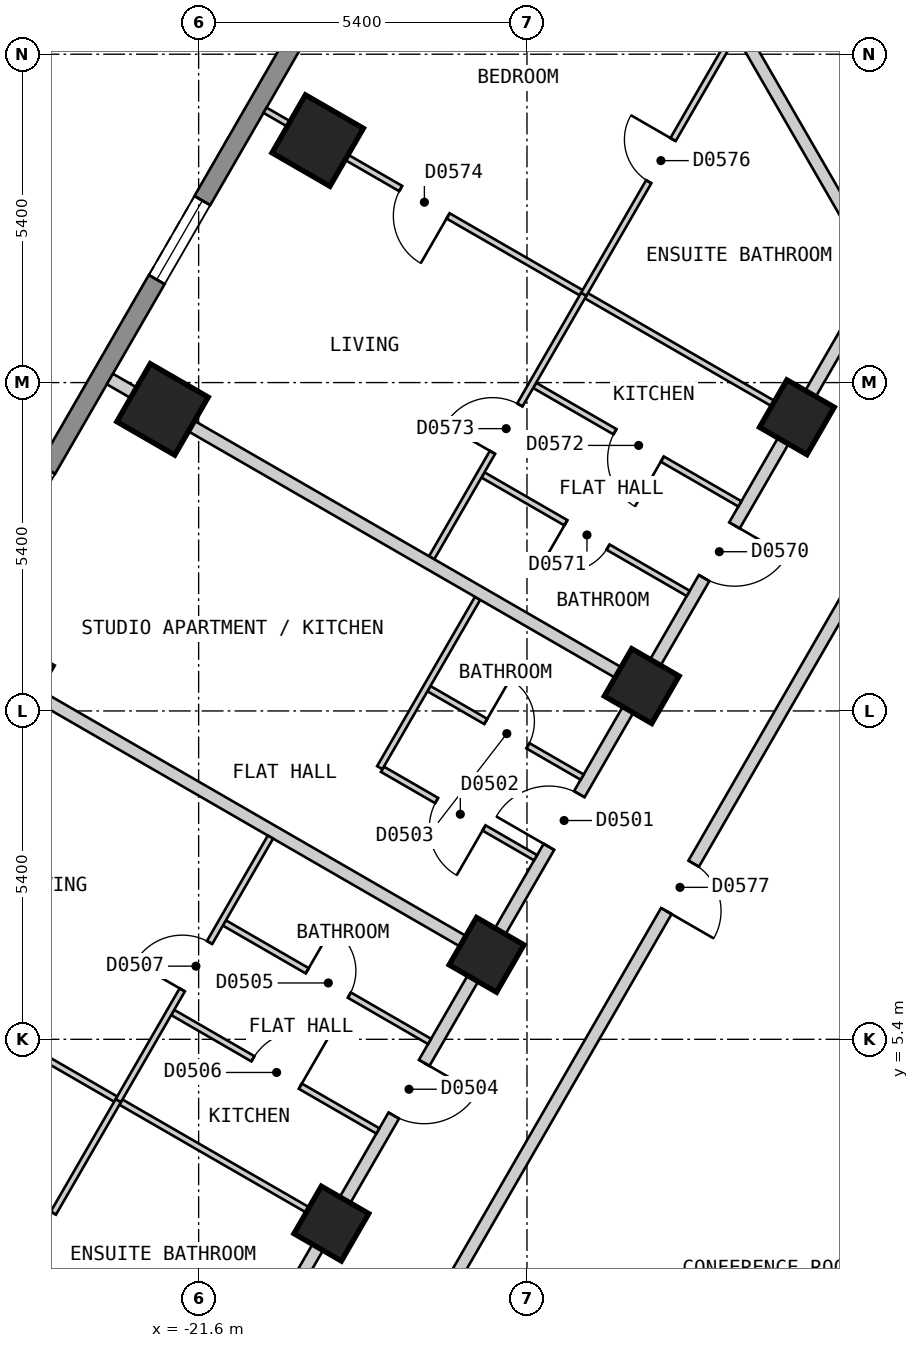
"""IFC4 building model, lengths in metres.
Left out: names, types, materials, properties, quantities, classifications, styles, units other than length and angle.
Written with IfcOpenShell. Run it as: python <this file> out.ifc"""

import sys

from ifc_helpers import new_model, si_unit, direction, frame, frame_2d, origin, origin_2d, place, context, subcontext, project, spatial, polyline, rectangle, outline, extrude, element, fill, save


model = new_model("IFC4")
c1 = context("Model", 3, precision=1e-05, world=origin(), true_north=direction((0.0, 1.0)))
c2 = subcontext(c1, "Body", "Model", "MODEL_VIEW")
j1 = project(units=[si_unit("LENGTHUNIT", "METRE"), si_unit("PLANEANGLEUNIT", "RADIAN")], contexts=[c1])
p1 = place(None, origin())
s1 = spatial("IfcSite", under=j1, at=p1, CompositionType="ELEMENT")
p2 = place(p1, origin())
s2 = spatial("IfcBuilding", under=s1, at=p2, CompositionType="ELEMENT")
p3 = place(p2, frame((0.0, 0.0, 44.4)))
s3 = spatial("IfcBuildingStorey", under=s2, at=p3, CompositionType="ELEMENT", Elevation=44.4)
for number, where, z_axis, x_axis in (
    (1, (-19.642, 20.18, 0.0), (0.0, 0.0, 1.0), (-0.5, -0.866, 0.0)),
    (2, (-22.194, 15.759, 0.0), (0.0, 0.0, 1.0), (-0.5, -0.866, 0.0)),
    (3, (-24.746, 11.339, 0.0), (0.0, 0.0, 1.0), (-0.5, -0.866, 0.0)),
):
    element("IfcColumn", number, at=place(p3, frame(where, z_axis=z_axis, x_axis=x_axis)), inside=s3, PredefinedType="COLUMN", context=c2, shape_type="SweptSolid", body=[
        extrude(rectangle(XDim=1.1, YDim=1.1, at=origin_2d()), origin(), (0.0, 0.0, 1.0), 3.0),
    ])
for number, where, z_axis, x_axis in (
    (4, (-11.761, 15.63, 0.0), (0.0, 0.0, 1.0), (-0.5, -0.866, 0.0)),
    (5, (-14.313, 11.209, 0.0), (0.0, 0.0, 1.0), (-0.5, -0.866, 0.0)),
    (6, (-16.865, 6.789, 0.0), (0.0, 0.0, 1.0), (-0.5, -0.866, 0.0)),
    (7, (-19.417, 2.369, 0.0), (0.0, 0.0, 1.0), (-0.5, -0.866, 0.0)),
):
    element("IfcColumn", number, at=place(p3, frame(where, z_axis=z_axis, x_axis=x_axis)), inside=s3, PredefinedType="COLUMN", context=c2, shape_type="SweptSolid", body=[
        extrude(rectangle(XDim=0.9, YDim=0.9, at=origin_2d()), origin(), (0.0, 0.0, 1.0), 3.0),
    ])
p4 = place(p3, frame((-17.71, 25.825, 0.0), z_axis=(0.0, 0.0, 1.0), x_axis=(-0.500001938803, -0.866024284413, 0.0)))
e8 = element("IfcWall", 8, at=p4, inside=s3, PredefinedType="SOLIDWALL", context=c2, shape_type="SweptSolid", body=[
    extrude(outline(polyline([(0.0, -0.15), (27.02, -0.15), (26.94, 0.15), (0.08, 0.15), (0.0, -0.15)])), origin(), (0.0, 0.0, 1.0), 2.7),
])
p5 = place(p4, frame((2.553, 0.0, 0.15)))
e9 = element("IfcOpeningElement", 9, at=p5, cuts=e8, PredefinedType="OPENING", context=c2, shape_type="SweptSolid", body=[
    extrude(rectangle(XDim=1.5, YDim=2.1, at=frame_2d((0.75, 1.05))), frame((0.0, 0.16, 0.0), z_axis=(0.0, -1.0, 0.0), x_axis=(1.0, 0.0, 0.0)), (0.0, 0.0, 1.0), 0.32),
])
p6 = place(p4, frame((7.658, 0.0, 0.15)))
e10 = element("IfcOpeningElement", 10, at=p6, cuts=e8, PredefinedType="OPENING", context=c2, shape_type="SweptSolid", body=[
    extrude(rectangle(XDim=1.5, YDim=2.1, at=frame_2d((0.75, 1.05))), frame((0.0, 0.16, 0.0), z_axis=(0.0, -1.0, 0.0), x_axis=(1.0, 0.0, 0.0)), (0.0, 0.0, 1.0), 0.32),
])
p7 = place(p4, frame((12.761, 0.0, 0.15)))
e11 = element("IfcOpeningElement", 11, at=p7, cuts=e8, PredefinedType="OPENING", context=c2, shape_type="SweptSolid", body=[
    extrude(rectangle(XDim=1.5, YDim=2.1, at=frame_2d((0.75, 1.05))), frame((0.0, 0.16, 0.0), z_axis=(0.0, -1.0, 0.0), x_axis=(1.0, 0.0, 0.0)), (0.0, 0.0, 1.0), 0.32),
])
p8 = place(p4, frame((17.865, 0.0, 0.15)))
e12 = element("IfcOpeningElement", 12, at=p8, cuts=e8, PredefinedType="OPENING", context=c2, shape_type="SweptSolid", body=[
    extrude(rectangle(XDim=1.5, YDim=2.1, at=frame_2d((0.75, 1.05))), frame((0.0, 0.16, 0.0), z_axis=(0.0, -1.0, 0.0), x_axis=(1.0, 0.0, 0.0)), (0.0, 0.0, 1.0), 0.32),
])
p9 = place(p4, frame((22.969, 0.0, 0.15)))
e13 = element("IfcOpeningElement", 13, at=p9, cuts=e8, PredefinedType="OPENING", context=c2, shape_type="SweptSolid", body=[
    extrude(rectangle(XDim=1.5, YDim=2.1, at=frame_2d((0.75, 1.05))), frame((0.0, 0.16, 0.0), z_axis=(0.0, -1.0, 0.0), x_axis=(1.0, 0.0, 0.0)), (0.0, 0.0, 1.0), 0.32),
])
p10 = place(p3, frame((-18.244, -0.001, 0.0), z_axis=(0.0, 0.0, 1.0), x_axis=(0.499962999376, 0.866046765051, 0.0)))
e14 = element("IfcWall", 14, at=p10, inside=s3, PredefinedType="PARTITIONING", context=c2, shape_type="SweptSolid", body=[
    extrude(rectangle(XDim=18.245, YDim=0.2, at=frame_2d((9.123, 0.0))), origin(), (0.0, 0.0, 1.0), 2.7),
])
p11 = place(p10, frame((8.672, 0.0, 0.0)))
e15 = element("IfcOpeningElement", 15, at=p11, cuts=e14, PredefinedType="OPENING", context=c2, shape_type="SweptSolid", body=[
    extrude(rectangle(XDim=0.9, YDim=2.1, at=frame_2d((0.45, 1.05))), frame((0.0, 0.11, 0.0), z_axis=(0.0, -1.0, 0.0), x_axis=(1.0, 0.0, 0.0)), (0.0, 0.0, 1.0), 0.22),
])
p12 = place(p3, frame((-20.727, 0.099, 0.0), z_axis=(0.0, 0.0, 1.0), x_axis=(0.499993204491, 0.866029327138, 0.0)))
e16 = element("IfcWall", 16, at=p12, inside=s3, PredefinedType="PARTITIONING", context=c2, shape_type="SweptSolid", body=[
    extrude(rectangle(XDim=20.554, YDim=0.2, at=frame_2d((10.277, 0.0))), origin(), (0.0, 0.0, 1.0), 2.7),
])
p13 = place(p12, frame((9.776, 0.0, 0.0)))
e17 = element("IfcOpeningElement", 17, at=p13, cuts=e16, PredefinedType="OPENING", context=c2, shape_type="SweptSolid", body=[
    extrude(rectangle(XDim=1.0, YDim=2.1, at=frame_2d((0.5, 1.05))), frame((0.0, 0.11, 0.0), z_axis=(0.0, -1.0, 0.0), x_axis=(1.0, 0.0, 0.0)), (0.0, 0.0, 1.0), 0.22),
])
p14 = place(p12, frame((4.673, 0.0, 0.0)))
e18 = element("IfcOpeningElement", 18, at=p14, cuts=e16, PredefinedType="OPENING", context=c2, shape_type="SweptSolid", body=[
    extrude(rectangle(XDim=1.0, YDim=2.1, at=frame_2d((0.5, 1.05))), frame((0.0, 0.11, 0.0), z_axis=(0.0, -1.0, 0.0), x_axis=(1.0, 0.0, 0.0)), (0.0, 0.0, 1.0), 0.22),
])
p15 = place(p12, frame((14.88, 0.0, 0.0)))
e19 = element("IfcOpeningElement", 19, at=p15, cuts=e16, PredefinedType="OPENING", context=c2, shape_type="SweptSolid", body=[
    extrude(rectangle(XDim=1.0, YDim=2.1, at=frame_2d((0.5, 1.05))), frame((0.0, 0.11, 0.0), z_axis=(0.0, -1.0, 0.0), x_axis=(1.0, 0.0, 0.0)), (0.0, 0.0, 1.0), 0.22),
])
p16 = place(p3, frame((-21.177, 7.314, 0.0), z_axis=(0.0, 0.0, 1.0), x_axis=(0.865979019114, -0.500080332001, 0.0)))
e20 = element("IfcWall", 20, at=p16, inside=s3, PredefinedType="PARTITIONING", context=c2, shape_type="SweptSolid", body=[
    extrude(rectangle(XDim=3.897, YDim=0.1, at=frame_2d((1.949, 0.0))), origin(), (0.0, 0.0, 1.0), 2.7),
])
p17 = place(p16, frame((1.574, 0.0, 0.0)))
e21 = element("IfcOpeningElement", 21, at=p17, cuts=e20, PredefinedType="OPENING", context=c2, shape_type="SweptSolid", body=[
    extrude(rectangle(XDim=0.8, YDim=2.1, at=frame_2d((0.4, 1.05))), frame((0.0, 0.06, 0.0), z_axis=(0.0, -1.0, 0.0), x_axis=(1.0, 0.0, 0.0)), (0.0, 0.0, 1.0), 0.12),
])
p18 = place(p3, frame((-22.027, 5.842, 0.0), z_axis=(0.0, 0.0, 1.0), x_axis=(0.865979019114, -0.500080332001, 0.0)))
e22 = element("IfcWall", 22, at=p18, inside=s3, PredefinedType="PARTITIONING", context=c2, shape_type="SweptSolid", body=[
    extrude(rectangle(XDim=3.897, YDim=0.1, at=frame_2d((1.949, 0.0))), origin(), (0.0, 0.0, 1.0), 2.7),
])
p19 = place(p18, frame((1.524, 0.0, 0.0)))
e23 = element("IfcOpeningElement", 23, at=p19, cuts=e22, PredefinedType="OPENING", context=c2, shape_type="SweptSolid", body=[
    extrude(rectangle(XDim=0.9, YDim=2.1, at=frame_2d((0.45, 1.05))), frame((0.0, 0.06, 0.0), z_axis=(0.0, -1.0, 0.0), x_axis=(1.0, 0.0, 0.0)), (0.0, 0.0, 1.0), 0.12),
])
p20 = place(p3, frame((-28.164, 7.419, 0.0), z_axis=(0.0, 0.0, 1.0), x_axis=(0.866047370643, -0.499961950354, 0.0)))
e24 = element("IfcWall", 24, at=p20, inside=s3, PredefinedType="PARTITIONING", context=c2, shape_type="SweptSolid", body=[
    extrude(rectangle(XDim=10.001, YDim=0.1, at=frame_2d((5.0, 0.0))), origin(), (0.0, 0.0, 1.0), 2.7),
])
p21 = place(p20, frame((2.577, 0.0, 0.0)))
e25 = element("IfcOpeningElement", 25, at=p21, cuts=e24, PredefinedType="OPENING", context=c2, shape_type="SweptSolid", body=[
    extrude(rectangle(XDim=0.9, YDim=2.1, at=frame_2d((0.45, 1.05))), frame((0.0, 0.06, 0.0), z_axis=(0.0, -1.0, 0.0), x_axis=(1.0, 0.0, 0.0)), (0.0, 0.0, 1.0), 0.12),
])
p22 = place(p3, frame((-18.577, 9.841, 0.0), z_axis=(0.0, 0.0, 1.0), x_axis=(0.865899003441, -0.500218867937, 0.0)))
e26 = element("IfcWall", 26, at=p22, inside=s3, PredefinedType="PARTITIONING", context=c2, shape_type="SweptSolid", body=[
    extrude(rectangle(XDim=2.909, YDim=0.1, at=frame_2d((1.455, 0.0))), origin(), (0.0, 0.0, 1.0), 2.7),
])
p23 = place(p22, frame((1.029, 0.0, 0.0)))
e27 = element("IfcOpeningElement", 27, at=p23, cuts=e26, PredefinedType="OPENING", context=c2, shape_type="SweptSolid", body=[
    extrude(rectangle(XDim=0.9, YDim=2.1, at=frame_2d((0.45, 1.05))), frame((0.0, 0.06, 0.0), z_axis=(0.0, -1.0, 0.0), x_axis=(1.0, 0.0, 0.0)), (0.0, 0.0, 1.0), 0.12),
])
p24 = place(p3, frame((-16.923, 14.681, 0.0), z_axis=(0.0, 0.0, 1.0), x_axis=(0.866087525071, -0.499892387336, 0.0)))
e28 = element("IfcWall", 28, at=p24, inside=s3, PredefinedType="PARTITIONING", context=c2, shape_type="SweptSolid", body=[
    extrude(rectangle(XDim=3.897, YDim=0.1, at=frame_2d((1.948, 0.0))), origin(), (0.0, 0.0, 1.0), 2.7),
])
p25 = place(p24, frame((1.574, 0.0, 0.0)))
e29 = element("IfcOpeningElement", 29, at=p25, cuts=e28, PredefinedType="OPENING", context=c2, shape_type="SweptSolid", body=[
    extrude(rectangle(XDim=0.8, YDim=2.1, at=frame_2d((0.4, 1.05))), frame((0.0, 0.06, 0.0), z_axis=(0.0, -1.0, 0.0), x_axis=(1.0, 0.0, 0.0)), (0.0, 0.0, 1.0), 0.12),
])
p26 = place(p3, frame((-16.073, 16.154, 0.0), z_axis=(0.0, 0.0, 1.0), x_axis=(0.865979019114, -0.500080332001, 0.0)))
e30 = element("IfcWall", 30, at=p26, inside=s3, PredefinedType="PARTITIONING", context=c2, shape_type="SweptSolid", body=[
    extrude(rectangle(XDim=3.897, YDim=0.1, at=frame_2d((1.949, 0.0))), origin(), (0.0, 0.0, 1.0), 2.7),
])
p27 = place(p26, frame((1.524, 0.0, 0.0)))
e31 = element("IfcOpeningElement", 31, at=p27, cuts=e30, PredefinedType="OPENING", context=c2, shape_type="SweptSolid", body=[
    extrude(rectangle(XDim=0.9, YDim=2.1, at=frame_2d((0.45, 1.05))), frame((0.0, 0.06, 0.0), z_axis=(0.0, -1.0, 0.0), x_axis=(1.0, 0.0, 0.0)), (0.0, 0.0, 1.0), 0.12),
])
p28 = place(p3, frame((-17.813, 11.167, 0.0), z_axis=(0.0, 0.0, 1.0), x_axis=(0.866087824531, -0.499891868507, 0.0)))
e32 = element("IfcWall", 32, at=p28, inside=s3, PredefinedType="PARTITIONING", context=c2, shape_type="SweptSolid", body=[
    extrude(rectangle(XDim=2.911, YDim=0.1, at=frame_2d((1.456, 0.0))), origin(), (0.0, 0.0, 1.0), 2.7),
])
p29 = place(p28, frame((1.08, 0.0, 0.0)))
e33 = element("IfcOpeningElement", 33, at=p29, cuts=e32, PredefinedType="OPENING", context=c2, shape_type="SweptSolid", body=[
    extrude(rectangle(XDim=0.8, YDim=2.1, at=frame_2d((0.4, 1.05))), frame((0.0, 0.06, 0.0), z_axis=(0.0, -1.0, 0.0), x_axis=(1.0, 0.0, 0.0)), (0.0, 0.0, 1.0), 0.12),
])
p30 = place(p3, frame((-20.508, 20.679, 0.0), z_axis=(0.0, 0.0, 1.0), x_axis=(0.866047370643, -0.499961950354, 0.0)))
e34 = element("IfcWall", 34, at=p30, inside=s3, PredefinedType="PARTITIONING", context=c2, shape_type="SweptSolid", body=[
    extrude(rectangle(XDim=10.001, YDim=0.1, at=frame_2d((5.0, 0.0))), origin(), (0.0, 0.0, 1.0), 2.7),
])
p31 = place(p30, frame((2.576, 0.0, 0.0)))
e35 = element("IfcOpeningElement", 35, at=p31, cuts=e34, PredefinedType="OPENING", context=c2, shape_type="SweptSolid", body=[
    extrude(rectangle(XDim=0.9, YDim=2.1, at=frame_2d((0.45, 1.05))), frame((0.0, 0.06, 0.0), z_axis=(0.0, -1.0, 0.0), x_axis=(1.0, 0.0, 0.0)), (0.0, 0.0, 1.0), 0.12),
])
p32 = place(p3, frame((-18.621, 9.867, 0.0), z_axis=(0.0, 0.0, 1.0), x_axis=(0.500197891286, 0.865911121047, 0.0)))
e36 = element("IfcWall", 36, at=p32, inside=s3, PredefinedType="PARTITIONING", context=c2, shape_type="SweptSolid", body=[
    extrude(rectangle(XDim=3.215, YDim=0.1, at=frame_2d((1.607, 0.0))), origin(), (0.0, 0.0, 1.0), 2.7),
])
p33 = place(p3, frame((-25.358, 0.173, 0.0), z_axis=(0.0, 0.0, 1.0), x_axis=(0.500180754623, 0.8659210199, 0.0)))
e37 = element("IfcWall", 37, at=p33, inside=s3, PredefinedType="PARTITIONING", context=c2, shape_type="SweptSolid", body=[
    extrude(rectangle(XDim=4.872, YDim=0.1, at=frame_2d((2.436, 0.0))), origin(), (0.0, 0.0, 1.0), 2.7),
])
p34 = place(p33, frame((1.936, 0.0, 0.0)))
e38 = element("IfcOpeningElement", 38, at=p34, cuts=e37, PredefinedType="OPENING", context=c2, shape_type="SweptSolid", body=[
    extrude(rectangle(XDim=0.8, YDim=2.1, at=frame_2d((0.4, 1.05))), frame((0.0, 0.06, 0.0), z_axis=(0.0, -1.0, 0.0), x_axis=(1.0, 0.0, 0.0)), (0.0, 0.0, 1.0), 0.12),
])
p35 = place(p3, frame((-17.768, 13.319, 0.0), z_axis=(0.0, 0.0, 1.0), x_axis=(0.499958946799, 0.866049104564, 0.0)))
e39 = element("IfcWall", 39, at=p35, inside=s3, PredefinedType="PARTITIONING", context=c2, shape_type="SweptSolid", body=[
    extrude(rectangle(XDim=5.004, YDim=0.1, at=frame_2d((2.502, 0.0))), origin(), (0.0, 0.0, 1.0), 2.7),
])
p36 = place(p35, frame((2.002, 0.0, 0.0)))
e40 = element("IfcOpeningElement", 40, at=p36, cuts=e39, PredefinedType="OPENING", context=c2, shape_type="SweptSolid", body=[
    extrude(rectangle(XDim=0.9, YDim=2.1, at=frame_2d((0.45, 1.05))), frame((0.0, 0.06, 0.0), z_axis=(0.0, -1.0, 0.0), x_axis=(1.0, 0.0, 0.0)), (0.0, 0.0, 1.0), 0.12),
])
p37 = place(p3, frame((-12.629, 21.874, 0.0), z_axis=(0.0, 0.0, 1.0), x_axis=(0.500024801635, -0.86601108408, 0.0)))
e41 = element("IfcWall", 41, at=p37, inside=s3, PredefinedType="PARTITIONING", context=c2, shape_type="SweptSolid", body=[
    extrude(rectangle(XDim=4.473, YDim=0.2, at=frame_2d((2.237, 0.0))), origin(), (0.0, 0.0, 1.0), 2.7),
])
p38 = place(p3, frame((-25.611, 11.839, 0.0), z_axis=(0.0, 0.0, 1.0), x_axis=(0.866022959057, -0.500004234368, 0.0)))
e42 = element("IfcWall", 42, at=p38, inside=s3, PredefinedType="PARTITIONING", context=c2, shape_type="SweptSolid", body=[
    extrude(rectangle(XDim=10.0, YDim=0.2, at=frame_2d((5.0, 0.0))), origin(), (0.0, 0.0, 1.0), 2.7),
])
p39 = place(p3, frame((-23.06, 16.259, 0.0), z_axis=(0.0, 0.0, 1.0), x_axis=(0.866047370643, -0.499961950354, 0.0)))
e43 = element("IfcWall", 43, at=p39, inside=s3, PredefinedType="PARTITIONING", context=c2, shape_type="SweptSolid", body=[
    extrude(rectangle(XDim=10.001, YDim=0.2, at=frame_2d((5.0, 0.0))), origin(), (0.0, 0.0, 1.0), 2.7),
])
p40 = place(p3, frame((-22.921, 4.392, 0.0), z_axis=(0.0, 0.0, 1.0), x_axis=(0.499958946799, 0.866049104564, 0.0)))
e44 = element("IfcWall", 44, at=p40, inside=s3, PredefinedType="PARTITIONING", context=c2, shape_type="SweptSolid", body=[
    extrude(rectangle(XDim=5.004, YDim=0.1, at=frame_2d((2.502, 0.0))), origin(), (0.0, 0.0, 1.0), 2.7),
])
p41 = place(p40, frame((2.103, 0.0, 0.0)))
e45 = element("IfcOpeningElement", 45, at=p41, cuts=e44, PredefinedType="OPENING", context=c2, shape_type="SweptSolid", body=[
    extrude(rectangle(XDim=0.9, YDim=2.1, at=frame_2d((0.45, 1.05))), frame((0.0, 0.06, 0.0), z_axis=(0.0, -1.0, 0.0), x_axis=(1.0, 0.0, 0.0)), (0.0, 0.0, 1.0), 0.12),
])
p42 = place(p3, frame((-15.266, 17.653, 0.0), z_axis=(0.0, 0.0, 1.0), x_axis=(0.500007182864, 0.866021256716, 0.0)))
e46 = element("IfcWall", 46, at=p42, inside=s3, PredefinedType="PARTITIONING", context=c2, shape_type="SweptSolid", body=[
    extrude(rectangle(XDim=4.874, YDim=0.1, at=frame_2d((2.437, 0.0))), origin(), (0.0, 0.0, 1.0), 2.7),
])
p43 = place(p42, frame((2.137, 0.0, 0.0)))
e47 = element("IfcOpeningElement", 47, at=p43, cuts=e46, PredefinedType="OPENING", context=c2, shape_type="SweptSolid", body=[
    extrude(rectangle(XDim=0.8, YDim=2.1, at=frame_2d((0.4, 1.05))), frame((0.0, 0.06, 0.0), z_axis=(0.0, -1.0, 0.0), x_axis=(1.0, 0.0, 0.0)), (0.0, 0.0, 1.0), 0.12),
])
p44 = place(p6, origin())
e48 = element("IfcWindow", 48, at=p44, inside=s3, PartitioningType="SINGLE_PANEL", PredefinedType="WINDOW", context=c2, shape_type="SweptSolid", body=[
    extrude(rectangle(XDim=1.5, YDim=2.1, at=frame_2d((0.75, 1.05))), frame((0.0, 0.03, 0.0), z_axis=(0.0, -1.0, 0.0), x_axis=(1.0, 0.0, 0.0)), (0.0, 0.0, 1.0), 0.06),
])
fill(e10, e48)
p45 = place(p13, origin())
e49 = element("IfcDoor", 49, at=p45, inside=s3, OperationType="SINGLE_SWING_LEFT", PredefinedType="DOOR", context=c2, shape_type="SweptSolid", body=[
    extrude(rectangle(XDim=1.0, YDim=2.1, at=frame_2d((0.5, 1.05))), frame((0.0, 0.025, 0.0), z_axis=(0.0, -1.0, 0.0), x_axis=(1.0, 0.0, 0.0)), (0.0, 0.0, 1.0), 0.05),
])
fill(e17, e49)
p46 = place(p23, origin())
e50 = element("IfcDoor", 50, at=p46, inside=s3, OperationType="SINGLE_SWING_RIGHT", PredefinedType="DOOR", context=c2, shape_type="SweptSolid", body=[
    extrude(rectangle(XDim=0.9, YDim=2.1, at=frame_2d((0.45, 1.05))), frame((0.0, 0.025, 0.0), z_axis=(0.0, -1.0, 0.0), x_axis=(1.0, 0.0, 0.0)), (0.0, 0.0, 1.0), 0.05),
])
fill(e27, e50)
p47 = place(p29, origin())
e51 = element("IfcDoor", 51, at=p47, inside=s3, OperationType="SINGLE_SWING_LEFT", PredefinedType="DOOR", context=c2, shape_type="SweptSolid", body=[
    extrude(rectangle(XDim=0.8, YDim=2.1, at=frame_2d((0.4, 1.05))), frame((0.0, 0.025, 0.0), z_axis=(0.0, -1.0, 0.0), x_axis=(1.0, 0.0, 0.0)), (0.0, 0.0, 1.0), 0.05),
])
fill(e33, e51)
p48 = place(p14, origin())
e52 = element("IfcDoor", 52, at=p48, inside=s3, OperationType="SINGLE_SWING_RIGHT", PredefinedType="DOOR", context=c2, shape_type="SweptSolid", body=[
    extrude(rectangle(XDim=1.0, YDim=2.1, at=frame_2d((0.5, 1.05))), frame((0.0, 0.025, 0.0), z_axis=(0.0, -1.0, 0.0), x_axis=(1.0, 0.0, 0.0)), (0.0, 0.0, 1.0), 0.05),
])
fill(e18, e52)
p49 = place(p17, origin())
e53 = element("IfcDoor", 53, at=p49, inside=s3, OperationType="SINGLE_SWING_LEFT", PredefinedType="DOOR", context=c2, shape_type="SweptSolid", body=[
    extrude(rectangle(XDim=0.8, YDim=2.1, at=frame_2d((0.4, 1.05))), frame((0.0, 0.025, 0.0), z_axis=(0.0, -1.0, 0.0), x_axis=(1.0, 0.0, 0.0)), (0.0, 0.0, 1.0), 0.05),
])
fill(e21, e53)
p50 = place(p19, origin())
e54 = element("IfcDoor", 54, at=p50, inside=s3, OperationType="SINGLE_SWING_RIGHT", PredefinedType="DOOR", context=c2, shape_type="SweptSolid", body=[
    extrude(rectangle(XDim=0.9, YDim=2.1, at=frame_2d((0.45, 1.05))), frame((0.0, 0.025, 0.0), z_axis=(0.0, -1.0, 0.0), x_axis=(1.0, 0.0, 0.0)), (0.0, 0.0, 1.0), 0.05),
])
fill(e23, e54)
p51 = place(p41, origin())
e55 = element("IfcDoor", 55, at=p51, inside=s3, OperationType="SINGLE_SWING_LEFT", PredefinedType="DOOR", context=c2, shape_type="SweptSolid", body=[
    extrude(rectangle(XDim=0.9, YDim=2.1, at=frame_2d((0.45, 1.05))), frame((0.0, 0.025, 0.0), z_axis=(0.0, -1.0, 0.0), x_axis=(1.0, 0.0, 0.0)), (0.0, 0.0, 1.0), 0.05),
])
fill(e45, e55)
p52 = place(p34, origin())
e56 = element("IfcDoor", 56, at=p52, inside=s3, OperationType="SINGLE_SWING_RIGHT", PredefinedType="DOOR", context=c2, shape_type="SweptSolid", body=[
    extrude(rectangle(XDim=0.8, YDim=2.1, at=frame_2d((0.4, 1.05))), frame((0.0, 0.025, 0.0), z_axis=(0.0, -1.0, 0.0), x_axis=(1.0, 0.0, 0.0)), (0.0, 0.0, 1.0), 0.05),
])
fill(e38, e56)
p53 = place(p15, origin())
e57 = element("IfcDoor", 57, at=p53, inside=s3, OperationType="SINGLE_SWING_RIGHT", PredefinedType="DOOR", context=c2, shape_type="SweptSolid", body=[
    extrude(rectangle(XDim=1.0, YDim=2.1, at=frame_2d((0.5, 1.05))), frame((0.0, 0.025, 0.0), z_axis=(0.0, -1.0, 0.0), x_axis=(1.0, 0.0, 0.0)), (0.0, 0.0, 1.0), 0.05),
])
fill(e19, e57)
p54 = place(p25, origin())
e58 = element("IfcDoor", 58, at=p54, inside=s3, OperationType="SINGLE_SWING_LEFT", PredefinedType="DOOR", context=c2, shape_type="SweptSolid", body=[
    extrude(rectangle(XDim=0.8, YDim=2.1, at=frame_2d((0.4, 1.05))), frame((0.0, 0.025, 0.0), z_axis=(0.0, -1.0, 0.0), x_axis=(1.0, 0.0, 0.0)), (0.0, 0.0, 1.0), 0.05),
])
fill(e29, e58)
p55 = place(p27, origin())
e59 = element("IfcDoor", 59, at=p55, inside=s3, OperationType="SINGLE_SWING_RIGHT", PredefinedType="DOOR", context=c2, shape_type="SweptSolid", body=[
    extrude(rectangle(XDim=0.9, YDim=2.1, at=frame_2d((0.45, 1.05))), frame((0.0, 0.025, 0.0), z_axis=(0.0, -1.0, 0.0), x_axis=(1.0, 0.0, 0.0)), (0.0, 0.0, 1.0), 0.05),
])
fill(e31, e59)
p56 = place(p36, origin())
e60 = element("IfcDoor", 60, at=p56, inside=s3, OperationType="SINGLE_SWING_LEFT", PredefinedType="DOOR", context=c2, shape_type="SweptSolid", body=[
    extrude(rectangle(XDim=0.9, YDim=2.1, at=frame_2d((0.45, 1.05))), frame((0.0, 0.025, 0.0), z_axis=(0.0, -1.0, 0.0), x_axis=(1.0, 0.0, 0.0)), (0.0, 0.0, 1.0), 0.05),
])
fill(e40, e60)
p57 = place(p31, origin())
e61 = element("IfcDoor", 61, at=p57, inside=s3, OperationType="SINGLE_SWING_RIGHT", PredefinedType="DOOR", context=c2, shape_type="SweptSolid", body=[
    extrude(rectangle(XDim=0.9, YDim=2.1, at=frame_2d((0.45, 1.05))), frame((0.0, 0.025, 0.0), z_axis=(0.0, -1.0, 0.0), x_axis=(1.0, 0.0, 0.0)), (0.0, 0.0, 1.0), 0.05),
])
fill(e35, e61)
p58 = place(p43, origin())
e62 = element("IfcDoor", 62, at=p58, inside=s3, OperationType="SINGLE_SWING_RIGHT", PredefinedType="DOOR", context=c2, shape_type="SweptSolid", body=[
    extrude(rectangle(XDim=0.8, YDim=2.1, at=frame_2d((0.4, 1.05))), frame((0.0, 0.025, 0.0), z_axis=(0.0, -1.0, 0.0), x_axis=(1.0, 0.0, 0.0)), (0.0, 0.0, 1.0), 0.05),
])
fill(e47, e62)
p59 = place(p11, origin())
e63 = element("IfcDoor", 63, at=p59, inside=s3, OperationType="SINGLE_SWING_LEFT", PredefinedType="DOOR", context=c2, shape_type="SweptSolid", body=[
    extrude(rectangle(XDim=0.9, YDim=2.1, at=frame_2d((0.45, 1.05))), frame((0.0, 0.025, 0.0), z_axis=(0.0, -1.0, 0.0), x_axis=(1.0, 0.0, 0.0)), (0.0, 0.0, 1.0), 0.05),
])
fill(e15, e63)
save(model, sys.argv[1])
